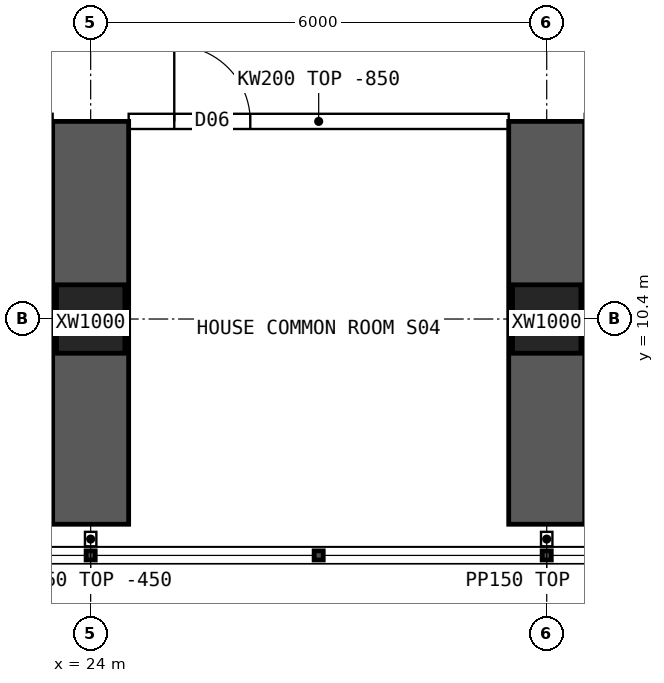
"""IFC4 building model, lengths in metres.
Left out: names, types, materials, properties, quantities, classifications, styles, units other than length and angle.
Written with IfcOpenShell. Run it as: python <this file> out.ifc"""

import sys

from ifc_helpers import new_model, si_unit, direction, frame, frame_2d, origin, origin_2d, place, context, subcontext, project, spatial, polyline, rectangle, hollow_rectangle, outline, extrude, element, fill, save


model = new_model("IFC4")
c1 = context("Model", 3, precision=1e-05, world=origin(), true_north=direction((0.0, 1.0)))
c2 = subcontext(c1, "Body", "Model", "MODEL_VIEW")
j1 = project(units=[si_unit("LENGTHUNIT", "METRE"), si_unit("PLANEANGLEUNIT", "RADIAN")], contexts=[c1])
p1 = place(None, origin())
s1 = spatial("IfcSite", under=j1, at=p1, CompositionType="ELEMENT")
p2 = place(p1, origin())
s2 = spatial("IfcBuilding", under=s1, at=p2, CompositionType="ELEMENT")
p3 = place(p2, frame((0.0, 0.0, 20.2)))
s3 = spatial("IfcBuildingStorey", under=s2, at=p3, CompositionType="ELEMENT", Elevation=20.2)
for number, where, z_axis, x_axis in (
    (1, (24.0, 10.4, 0.0), (0.0, 0.0, 1.0), (1.0, 0.0, 0.0)),
    (2, (30.0, 10.4, 0.0), (0.0, 0.0, 1.0), (1.0, 0.0, 0.0)),
):
    element("IfcColumn", number, at=place(p3, frame(where, z_axis=z_axis, x_axis=x_axis)), inside=s3, PredefinedType="COLUMN", context=c2, shape_type="SweptSolid", body=[
        extrude(hollow_rectangle(XDim=0.9, YDim=0.9, WallThickness=0.09, at=origin_2d()), origin(), (0.0, 0.0, 1.0), 3.75),
    ])
for number, where, z_axis, x_axis in (
    (3, (24.0, 7.7, 0.0), (0.0, 0.0, 1.0), (0.0, 1.0, 0.0)),
    (4, (30.0, 7.7, 0.0), (0.0, 0.0, 1.0), (0.0, 1.0, 0.0)),
):
    element("IfcWall", number, at=place(p3, frame(where, z_axis=z_axis, x_axis=x_axis)), inside=s3, PredefinedType="SHEAR", context=c2, shape_type="SweptSolid", body=[
        extrude(rectangle(XDim=5.3, YDim=1.0, at=frame_2d((2.65, 0.0))), origin(), (0.0, 0.0, 1.0), 3.75),
    ])
p4 = place(p3, frame((24.5, 13.0, 0.0), z_axis=(0.0, 0.0, 1.0), x_axis=(1.0, 0.0, 0.0)))
e5 = element("IfcWall", 5, at=p4, inside=s3, PredefinedType="SOLIDWALL", context=c2, shape_type="SweptSolid", body=[
    extrude(outline(polyline([(0.0, 0.0), (5.0, 0.0), (5.0, 2.9), (0.0, 2.9), (0.0, 0.0)])), frame((0.0, 0.1, 0.0), z_axis=(0.0, -1.0, 0.0), x_axis=(1.0, 0.0, 0.0)), (0.0, 0.0, 1.0), 0.2),
])
p5 = place(p4, frame((0.6, 0.0, 0.0)))
e6 = element("IfcOpeningElement", 6, at=p5, cuts=e5, PredefinedType="OPENING", context=c2, shape_type="SweptSolid", body=[
    extrude(rectangle(XDim=1.0, YDim=2.1, at=frame_2d((0.5, 1.05))), frame((0.0, 0.11, 0.0), z_axis=(0.0, -1.0, 0.0), x_axis=(1.0, 0.0, 0.0)), (0.0, 0.0, 1.0), 0.22),
])
p6 = place(p3, frame((23.55, 10.5, 0.0), z_axis=(0.0, 0.0, 1.0), x_axis=(-1.0, 0.0, 0.0)))
e7 = element("IfcWall", 7, at=p6, inside=s3, PredefinedType="PARTITIONING", context=c2, shape_type="SweptSolid", body=[
    extrude(outline(polyline([(0.0, 0.0), (1.425, 0.0), (1.425, 2.9), (0.0, 2.9), (0.0, 0.0)])), frame((0.0, 0.05, 0.0), z_axis=(0.0, -1.0, 0.0), x_axis=(1.0, 0.0, 0.0)), (0.0, 0.0, 1.0), 0.1),
])
p7 = place(p6, frame((0.288, 0.0, 0.0)))
e8 = element("IfcOpeningElement", 8, at=p7, cuts=e7, PredefinedType="OPENING", context=c2, shape_type="SweptSolid", body=[
    extrude(rectangle(XDim=0.9, YDim=2.1, at=frame_2d((0.45, 1.05))), frame((0.0, 0.06, 0.0), z_axis=(0.0, -1.0, 0.0), x_axis=(1.0, 0.0, 0.0)), (0.0, 0.0, 1.0), 0.12),
])
p8 = place(p3, frame((31.875, 10.5, 0.0), z_axis=(0.0, 0.0, 1.0), x_axis=(-1.0, 0.0, 0.0)))
e9 = element("IfcWall", 9, at=p8, inside=s3, PredefinedType="PARTITIONING", context=c2, shape_type="SweptSolid", body=[
    extrude(outline(polyline([(0.0, 0.0), (1.425, 0.0), (1.425, 2.9), (0.0, 2.9), (0.0, 0.0)])), frame((0.0, 0.05, 0.0), z_axis=(0.0, -1.0, 0.0), x_axis=(1.0, 0.0, 0.0)), (0.0, 0.0, 1.0), 0.1),
])
p9 = place(p8, frame((0.238, 0.0, 0.0)))
e10 = element("IfcOpeningElement", 10, at=p9, cuts=e9, PredefinedType="OPENING", context=c2, shape_type="SweptSolid", body=[
    extrude(rectangle(XDim=0.9, YDim=2.1, at=frame_2d((0.45, 1.05))), frame((0.0, 0.06, 0.0), z_axis=(0.0, -1.0, 0.0), x_axis=(1.0, 0.0, 0.0)), (0.0, 0.0, 1.0), 0.12),
])
for number, where, z_axis, x_axis in (
    (11, (24.0, 7.6, 0.0), (0.0, 0.0, 1.0), (0.0, -1.0, 0.0)),
    (12, (30.0, 7.6, 0.0), (0.0, 0.0, 1.0), (0.0, -1.0, 0.0)),
):
    element("IfcWall", number, at=place(p3, frame(where, z_axis=z_axis, x_axis=x_axis)), inside=s3, PredefinedType="PARTITIONING", context=c2, shape_type="SweptSolid", body=[
        extrude(rectangle(XDim=0.19, YDim=0.15, at=frame_2d((0.095, 0.0))), origin(), (0.0, 0.0, 1.0), 3.3),
    ])
p10 = place(p5, origin())
e13 = element("IfcDoor", 13, at=p10, inside=s3, OperationType="SINGLE_SWING_LEFT", PredefinedType="DOOR", context=c2, shape_type="SweptSolid", body=[
    extrude(rectangle(XDim=1.0, YDim=2.1, at=frame_2d((0.5, 1.05))), frame((0.0, 0.025, 0.0), z_axis=(0.0, -1.0, 0.0), x_axis=(1.0, 0.0, 0.0)), (0.0, 0.0, 1.0), 0.05),
])
fill(e6, e13)
save(model, sys.argv[1])
